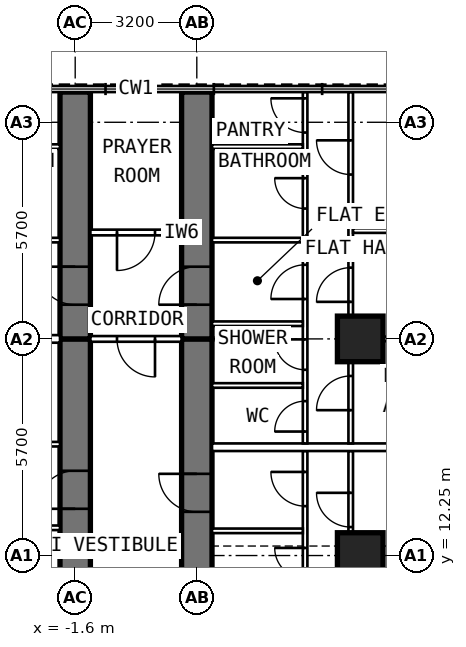
"""IFC4 building model, lengths in metres.
Left out: names, types, materials, properties, quantities, classifications, styles, units other than length and angle.
Written with IfcOpenShell. Run it as: python <this file> out.ifc"""

import sys

from ifc_helpers import new_model, si_unit, direction, frame, frame_2d, origin, origin_2d, place, context, subcontext, project, spatial, rectangle, extrude, element, fill, save


model = new_model("IFC4")
c1 = context("Model", 3, precision=1e-05, world=origin(), true_north=direction((0.0, 1.0)))
c2 = subcontext(c1, "Body", "Model", "MODEL_VIEW")
j1 = project(units=[si_unit("LENGTHUNIT", "METRE"), si_unit("PLANEANGLEUNIT", "RADIAN")], contexts=[c1])
p1 = place(None, origin())
s1 = spatial("IfcSite", under=j1, at=p1, CompositionType="ELEMENT")
p2 = place(p1, origin())
s2 = spatial("IfcBuilding", under=s1, at=p2, CompositionType="ELEMENT")
p3 = place(p2, frame((0.0, 0.0, 149.0)))
s3 = spatial("IfcBuildingStorey", under=s2, at=p3, CompositionType="ELEMENT", Elevation=149.0)
for number, where, z_axis, x_axis in (
    (1, (5.9, 12.25, 0.0), (0.0, 0.0, 1.0), (0.0, 1.0, 0.0)),
    (2, (5.9, 17.95, 0.0), (0.0, 0.0, 1.0), (0.0, 1.0, 0.0)),
):
    element("IfcColumn", number, at=place(p3, frame(where, z_axis=z_axis, x_axis=x_axis)), inside=s3, PredefinedType="COLUMN", context=c2, shape_type="SweptSolid", body=[
        extrude(rectangle(XDim=1.2, YDim=1.2, at=origin_2d()), origin(), (0.0, 0.0, 1.0), 3.6),
    ])
p4 = place(p3, frame((-1.6, 9.6, 0.0), z_axis=(0.0, 0.0, 1.0), x_axis=(0.0, 1.0, 0.0)))
e3 = element("IfcWall", 3, at=p4, inside=s3, PredefinedType="SHEAR", context=c2, shape_type="SweptSolid", body=[
    extrude(rectangle(XDim=8.35, YDim=0.8, at=frame_2d((4.175, 0.0))), origin(), (0.0, 0.0, 1.0), 3.6),
])
p5 = place(p4, frame((3.88, 0.0, 0.0)))
e4 = element("IfcOpeningElement", 4, at=p5, cuts=e3, PredefinedType="OPENING", context=c2, shape_type="SweptSolid", body=[
    extrude(rectangle(XDim=1.0, YDim=2.1, at=frame_2d((0.5, 1.05))), frame((0.0, 0.412, 0.0), z_axis=(0.0, -1.0, 0.0), x_axis=(1.0, 0.0, 0.0)), (0.0, 0.0, 1.0), 0.824),
])
p6 = place(p3, frame((-1.6, 17.95, 0.0), z_axis=(0.0, 0.0, 1.0), x_axis=(0.0, 1.0, 0.0)))
e5 = element("IfcWall", 5, at=p6, inside=s3, PredefinedType="SHEAR", context=c2, shape_type="SweptSolid", body=[
    extrude(rectangle(XDim=6.495, YDim=0.8, at=frame_2d((3.248, 0.0))), origin(), (0.0, 0.0, 1.0), 3.6),
])
p7 = place(p6, frame((0.9, 0.0, 0.0)))
e6 = element("IfcOpeningElement", 6, at=p7, cuts=e5, PredefinedType="OPENING", context=c2, shape_type="SweptSolid", body=[
    extrude(rectangle(XDim=1.0, YDim=2.1, at=frame_2d((0.5, 1.05))), frame((0.0, 0.412, 0.0), z_axis=(0.0, -1.0, 0.0), x_axis=(1.0, 0.0, 0.0)), (0.0, 0.0, 1.0), 0.824),
])
p8 = place(p3, frame((1.6, 9.6, 0.0), z_axis=(0.0, 0.0, 1.0), x_axis=(0.0, 1.0, 0.0)))
e7 = element("IfcWall", 7, at=p8, inside=s3, PredefinedType="SHEAR", context=c2, shape_type="SweptSolid", body=[
    extrude(rectangle(XDim=8.35, YDim=0.8, at=frame_2d((4.175, 0.0))), origin(), (0.0, 0.0, 1.0), 3.6),
])
p9 = place(p8, frame((3.8, 0.0, 0.0)))
e8 = element("IfcOpeningElement", 8, at=p9, cuts=e7, PredefinedType="OPENING", context=c2, shape_type="SweptSolid", body=[
    extrude(rectangle(XDim=1.0, YDim=2.1, at=frame_2d((0.5, 1.05))), frame((0.0, 0.412, 0.0), z_axis=(0.0, -1.0, 0.0), x_axis=(1.0, 0.0, 0.0)), (0.0, 0.0, 1.0), 0.824),
])
p10 = place(p3, frame((1.6, 17.95, 0.0), z_axis=(0.0, 0.0, 1.0), x_axis=(0.0, 1.0, 0.0)))
e9 = element("IfcWall", 9, at=p10, inside=s3, PredefinedType="SHEAR", context=c2, shape_type="SweptSolid", body=[
    extrude(rectangle(XDim=6.495, YDim=0.8, at=frame_2d((3.248, 0.0))), origin(), (0.0, 0.0, 1.0), 3.6),
])
p11 = place(p10, frame((0.9, 0.0, 0.0)))
e10 = element("IfcOpeningElement", 10, at=p11, cuts=e9, PredefinedType="OPENING", context=c2, shape_type="SweptSolid", body=[
    extrude(rectangle(XDim=1.0, YDim=2.1, at=frame_2d((0.5, 1.05))), frame((0.0, 0.412, 0.0), z_axis=(0.0, -1.0, 0.0), x_axis=(1.0, 0.0, 0.0)), (0.0, 0.0, 1.0), 0.824),
])
for number, where, z_axis, x_axis in (
    (11, (-2.0, 12.98, 0.0), (0.0, 0.0, 1.0), (-1.0, 0.0, 0.0)),
    (12, (-2.0, 15.18, 0.0), (0.0, 0.0, 1.0), (-1.0, 0.0, 0.0)),
    (13, (-2.0, 20.55, 0.0), (0.0, 0.0, 1.0), (-1.0, 0.0, 0.0)),
    (14, (-2.0, 23.01, 0.0), (0.0, 0.0, 1.0), (-1.0, 0.0, 0.0)),
):
    element("IfcWall", number, at=place(p3, frame(where, z_axis=z_axis, x_axis=x_axis)), inside=s3, PredefinedType="PARTITIONING", context=c2, shape_type="SweptSolid", body=[
        extrude(rectangle(XDim=2.39, YDim=0.12, at=frame_2d((1.195, 0.0))), origin(), (0.0, 0.0, 1.0), 3.35),
    ])
p12 = place(p3, frame((-2.0, 17.95, 0.0), z_axis=(0.0, 0.0, 1.0), x_axis=(-1.0, 0.0, 0.0)))
e15 = element("IfcWall", 15, at=p12, inside=s3, PredefinedType="PARTITIONING", context=c2, shape_type="SweptSolid", body=[
    extrude(rectangle(XDim=8.7, YDim=0.2, at=frame_2d((4.35, 0.0))), origin(), (0.0, 0.0, 1.0), 2.45),
])
p13 = place(p3, frame((4.45, 10.05, 0.0), z_axis=(0.0, 0.0, 1.0), x_axis=(0.0, 1.0, 0.0)))
e16 = element("IfcWall", 16, at=p13, inside=s3, PredefinedType="PARTITIONING", context=c2, shape_type="SweptSolid", body=[
    extrude(rectangle(XDim=4.95, YDim=0.12, at=frame_2d((2.475, 0.0))), origin(), (0.0, 0.0, 1.0), 3.35),
])
p14 = place(p13, frame((1.6, 0.0, 0.0)))
e17 = element("IfcOpeningElement", 17, at=p14, cuts=e16, PredefinedType="OPENING", context=c2, shape_type="SweptSolid", body=[
    extrude(rectangle(XDim=0.8, YDim=2.1, at=frame_2d((0.4, 1.05))), frame((0.0, 0.072, 0.0), z_axis=(0.0, -1.0, 0.0), x_axis=(1.0, 0.0, 0.0)), (0.0, 0.0, 1.0), 0.144),
])
p15 = place(p13, frame((3.5, 0.0, 0.0)))
e18 = element("IfcOpeningElement", 18, at=p15, cuts=e16, PredefinedType="OPENING", context=c2, shape_type="SweptSolid", body=[
    extrude(rectangle(XDim=0.9, YDim=2.1, at=frame_2d((0.45, 1.05))), frame((0.0, 0.072, 0.0), z_axis=(0.0, -1.0, 0.0), x_axis=(1.0, 0.0, 0.0)), (0.0, 0.0, 1.0), 0.144),
])
p16 = place(p3, frame((5.65, 9.6, 0.0), z_axis=(0.0, 0.0, 1.0), x_axis=(0.0, 1.0, 0.0)))
e19 = element("IfcWall", 19, at=p16, inside=s3, PredefinedType="PARTITIONING", context=c2, shape_type="SweptSolid", body=[
    extrude(rectangle(XDim=5.4, YDim=0.12, at=frame_2d((2.7, 0.0))), origin(), (0.0, 0.0, 1.0), 3.35),
])
p17 = place(p16, frame((3.4, 0.0, 0.0)))
e20 = element("IfcOpeningElement", 20, at=p17, cuts=e19, PredefinedType="OPENING", context=c2, shape_type="SweptSolid", body=[
    extrude(rectangle(XDim=0.9, YDim=2.1, at=frame_2d((0.45, 1.05))), frame((0.0, 0.072, 0.0), z_axis=(0.0, -1.0, 0.0), x_axis=(1.0, 0.0, 0.0)), (0.0, 0.0, 1.0), 0.144),
])
p18 = place(p3, frame((2.0, 12.9, 0.0), z_axis=(0.0, 0.0, 1.0), x_axis=(1.0, 0.0, 0.0)))
e21 = element("IfcWall", 21, at=p18, inside=s3, PredefinedType="PARTITIONING", context=c2, shape_type="SweptSolid", body=[
    extrude(rectangle(XDim=2.39, YDim=0.12, at=frame_2d((1.195, 0.0))), origin(), (0.0, 0.0, 1.0), 3.35),
])
p19 = place(p3, frame((4.45, 15.2, 0.0), z_axis=(0.0, 0.0, 1.0), x_axis=(0.0, 1.0, 0.0)))
e22 = element("IfcWall", 22, at=p19, inside=s3, PredefinedType="PARTITIONING", context=c2, shape_type="SweptSolid", body=[
    extrude(rectangle(XDim=9.245, YDim=0.12, at=frame_2d((4.623, 0.0))), origin(), (0.0, 0.0, 1.0), 3.35),
])
p20 = place(p19, frame((0.312, 0.0, 0.0)))
e23 = element("IfcOpeningElement", 23, at=p20, cuts=e22, PredefinedType="OPENING", context=c2, shape_type="SweptSolid", body=[
    extrude(rectangle(XDim=0.8, YDim=2.1, at=frame_2d((0.4, 1.05))), frame((0.0, 0.072, 0.0), z_axis=(0.0, -1.0, 0.0), x_axis=(1.0, 0.0, 0.0)), (0.0, 0.0, 1.0), 0.144),
])
p21 = place(p19, frame((1.938, 0.0, 0.0)))
e24 = element("IfcOpeningElement", 24, at=p21, cuts=e22, PredefinedType="OPENING", context=c2, shape_type="SweptSolid", body=[
    extrude(rectangle(XDim=0.8, YDim=2.1, at=frame_2d((0.4, 1.05))), frame((0.0, 0.072, 0.0), z_axis=(0.0, -1.0, 0.0), x_axis=(1.0, 0.0, 0.0)), (0.0, 0.0, 1.0), 0.144),
])
p22 = place(p19, frame((3.8, 0.0, 0.0)))
e25 = element("IfcOpeningElement", 25, at=p22, cuts=e22, PredefinedType="OPENING", context=c2, shape_type="SweptSolid", body=[
    extrude(rectangle(XDim=0.9, YDim=2.1, at=frame_2d((0.45, 1.05))), frame((0.0, 0.072, 0.0), z_axis=(0.0, -1.0, 0.0), x_axis=(1.0, 0.0, 0.0)), (0.0, 0.0, 1.0), 0.144),
])
p23 = place(p19, frame((6.18, 0.0, 0.0)))
e26 = element("IfcOpeningElement", 26, at=p23, cuts=e22, PredefinedType="OPENING", context=c2, shape_type="SweptSolid", body=[
    extrude(rectangle(XDim=0.8, YDim=2.1, at=frame_2d((0.4, 1.05))), frame((0.0, 0.072, 0.0), z_axis=(0.0, -1.0, 0.0), x_axis=(1.0, 0.0, 0.0)), (0.0, 0.0, 1.0), 0.144),
])
p24 = place(p19, frame((8.18, 0.0, 0.0)))
e27 = element("IfcOpeningElement", 27, at=p24, cuts=e22, PredefinedType="OPENING", context=c2, shape_type="SweptSolid", body=[
    extrude(rectangle(XDim=0.9, YDim=2.1, at=frame_2d((0.45, 1.05))), frame((0.0, 0.072, 0.0), z_axis=(0.0, -1.0, 0.0), x_axis=(1.0, 0.0, 0.0)), (0.0, 0.0, 1.0), 0.144),
])
p25 = place(p3, frame((5.65, 15.2, 0.0), z_axis=(0.0, 0.0, 1.0), x_axis=(0.0, 1.0, 0.0)))
e28 = element("IfcWall", 28, at=p25, inside=s3, PredefinedType="PARTITIONING", context=c2, shape_type="SweptSolid", body=[
    extrude(rectangle(XDim=9.245, YDim=0.12, at=frame_2d((4.623, 0.0))), origin(), (0.0, 0.0, 1.0), 3.35),
])
p26 = place(p25, frame((0.875, 0.0, 0.0)))
e29 = element("IfcOpeningElement", 29, at=p26, cuts=e28, PredefinedType="OPENING", context=c2, shape_type="SweptSolid", body=[
    extrude(rectangle(XDim=0.9, YDim=2.1, at=frame_2d((0.45, 1.05))), frame((0.0, 0.072, 0.0), z_axis=(0.0, -1.0, 0.0), x_axis=(1.0, 0.0, 0.0)), (0.0, 0.0, 1.0), 0.144),
])
p27 = place(p25, frame((3.725, 0.0, 0.0)))
e30 = element("IfcOpeningElement", 30, at=p27, cuts=e28, PredefinedType="OPENING", context=c2, shape_type="SweptSolid", body=[
    extrude(rectangle(XDim=0.9, YDim=2.1, at=frame_2d((0.45, 1.05))), frame((0.0, 0.072, 0.0), z_axis=(0.0, -1.0, 0.0), x_axis=(1.0, 0.0, 0.0)), (0.0, 0.0, 1.0), 0.144),
])
p28 = place(p25, frame((7.075, 0.0, 0.0)))
e31 = element("IfcOpeningElement", 31, at=p28, cuts=e28, PredefinedType="OPENING", context=c2, shape_type="SweptSolid", body=[
    extrude(rectangle(XDim=0.9, YDim=2.1, at=frame_2d((0.45, 1.05))), frame((0.0, 0.072, 0.0), z_axis=(0.0, -1.0, 0.0), x_axis=(1.0, 0.0, 0.0)), (0.0, 0.0, 1.0), 0.144),
])
p29 = place(p3, frame((5.71, 17.95, 0.0), z_axis=(0.0, 0.0, 1.0), x_axis=(1.0, 0.0, 0.0)))
e32 = element("IfcWall", 32, at=p29, inside=s3, PredefinedType="PARTITIONING", context=c2, shape_type="SweptSolid", body=[
    extrude(rectangle(XDim=4.99, YDim=0.12, at=frame_2d((2.495, 0.0))), origin(), (0.0, 0.0, 1.0), 2.45),
])
p30 = place(p3, frame((5.71, 20.8, 0.0), z_axis=(0.0, 0.0, 1.0), x_axis=(1.0, 0.0, 0.0)))
e33 = element("IfcWall", 33, at=p30, inside=s3, PredefinedType="PARTITIONING", context=c2, shape_type="SweptSolid", body=[
    extrude(rectangle(XDim=4.99, YDim=0.12, at=frame_2d((2.495, 0.0))), origin(), (0.0, 0.0, 1.0), 3.35),
])
for number, where, z_axis, x_axis in (
    (34, (2.0, 16.725, 0.0), (0.0, 0.0, 1.0), (1.0, 0.0, 0.0)),
    (35, (2.0, 18.35, 0.0), (0.0, 0.0, 1.0), (1.0, 0.0, 0.0)),
    (36, (2.0, 20.55, 0.0), (0.0, 0.0, 1.0), (1.0, 0.0, 0.0)),
    (37, (2.0, 23.01, 0.0), (0.0, 0.0, 1.0), (1.0, 0.0, 0.0)),
):
    element("IfcWall", number, at=place(p3, frame(where, z_axis=z_axis, x_axis=x_axis)), inside=s3, PredefinedType="PARTITIONING", context=c2, shape_type="SweptSolid", body=[
        extrude(rectangle(XDim=2.39, YDim=0.12, at=frame_2d((1.195, 0.0))), origin(), (0.0, 0.0, 1.0), 3.35),
    ])
p31 = place(p3, frame((2.0, 15.1, 0.0), z_axis=(0.0, 0.0, 1.0), x_axis=(1.0, 0.0, 0.0)))
e38 = element("IfcWall", 38, at=p31, inside=s3, PredefinedType="PARTITIONING", context=c2, shape_type="SweptSolid", body=[
    extrude(rectangle(XDim=8.7, YDim=0.2, at=frame_2d((4.35, 0.0))), origin(), (0.0, 0.0, 1.0), 3.35),
])
p32 = place(p3, frame((1.2, 20.75, 0.0), z_axis=(0.0, 0.0, 1.0), x_axis=(-1.0, 0.0, 0.0)))
e39 = element("IfcWall", 39, at=p32, inside=s3, PredefinedType="PARTITIONING", context=c2, shape_type="SweptSolid", body=[
    extrude(rectangle(XDim=2.4, YDim=0.15, at=frame_2d((1.2, 0.0))), origin(), (0.0, 0.0, 1.0), 3.35),
])
p33 = place(p32, frame((0.7, 0.0, 0.0)))
e40 = element("IfcOpeningElement", 40, at=p33, cuts=e39, PredefinedType="OPENING", context=c2, shape_type="SweptSolid", body=[
    extrude(rectangle(XDim=1.0, YDim=2.1, at=frame_2d((0.5, 1.05))), frame((0.0, 0.087, 0.0), z_axis=(0.0, -1.0, 0.0), x_axis=(1.0, 0.0, 0.0)), (0.0, 0.0, 1.0), 0.174),
])
p34 = place(p3, frame((1.2, 17.95, 0.0), z_axis=(0.0, 0.0, 1.0), x_axis=(-1.0, 0.0, 0.0)))
e41 = element("IfcWall", 41, at=p34, inside=s3, PredefinedType="PARTITIONING", context=c2, shape_type="SweptSolid", body=[
    extrude(rectangle(XDim=2.4, YDim=0.15, at=frame_2d((1.2, 0.0))), origin(), (0.0, 0.0, 1.0), 3.35),
])
p35 = place(p34, frame((0.7, 0.0, 0.0)))
e42 = element("IfcOpeningElement", 42, at=p35, cuts=e41, PredefinedType="OPENING", context=c2, shape_type="SweptSolid", body=[
    extrude(rectangle(XDim=1.0, YDim=2.1, at=frame_2d((0.5, 1.05))), frame((0.0, 0.087, 0.0), z_axis=(0.0, -1.0, 0.0), x_axis=(1.0, 0.0, 0.0)), (0.0, 0.0, 1.0), 0.174),
])
p36 = place(p5, origin())
e43 = element("IfcDoor", 43, at=p36, inside=s3, OperationType="SINGLE_SWING_LEFT", PredefinedType="DOOR", context=c2, shape_type="SweptSolid", body=[
    extrude(rectangle(XDim=1.0, YDim=2.1, at=frame_2d((0.5, 1.05))), frame((0.0, 0.15, 0.0), z_axis=(0.0, -1.0, 0.0), x_axis=(1.0, 0.0, 0.0)), (0.0, 0.0, 1.0), 0.3),
])
fill(e4, e43)
p37 = place(p7, origin())
e44 = element("IfcDoor", 44, at=p37, inside=s3, OperationType="SINGLE_SWING_RIGHT", PredefinedType="DOOR", context=c2, shape_type="SweptSolid", body=[
    extrude(rectangle(XDim=1.0, YDim=2.1, at=frame_2d((0.5, 1.05))), frame((0.0, 0.15, 0.0), z_axis=(0.0, -1.0, 0.0), x_axis=(1.0, 0.0, 0.0)), (0.0, 0.0, 1.0), 0.3),
])
fill(e6, e44)
p38 = place(p9, origin())
e45 = element("IfcDoor", 45, at=p38, inside=s3, OperationType="SINGLE_SWING_RIGHT", PredefinedType="DOOR", context=c2, shape_type="SweptSolid", body=[
    extrude(rectangle(XDim=1.0, YDim=2.1, at=frame_2d((0.5, 1.05))), frame((0.0, 0.15, 0.0), z_axis=(0.0, -1.0, 0.0), x_axis=(1.0, 0.0, 0.0)), (0.0, 0.0, 1.0), 0.3),
])
fill(e8, e45)
p39 = place(p17, origin())
e46 = element("IfcDoor", 46, at=p39, inside=s3, OperationType="SINGLE_SWING_RIGHT", PredefinedType="DOOR", context=c2, shape_type="SweptSolid", body=[
    extrude(rectangle(XDim=0.9, YDim=2.1, at=frame_2d((0.45, 1.05))), frame((0.0, 0.025, 0.0), z_axis=(0.0, -1.0, 0.0), x_axis=(1.0, 0.0, 0.0)), (0.0, 0.0, 1.0), 0.05),
])
fill(e20, e46)
p40 = place(p14, origin())
e47 = element("IfcDoor", 47, at=p40, inside=s3, OperationType="SINGLE_SWING_RIGHT", PredefinedType="DOOR", context=c2, shape_type="SweptSolid", body=[
    extrude(rectangle(XDim=0.8, YDim=2.1, at=frame_2d((0.4, 1.05))), frame((0.0, 0.025, 0.0), z_axis=(0.0, -1.0, 0.0), x_axis=(1.0, 0.0, 0.0)), (0.0, 0.0, 1.0), 0.05),
])
fill(e17, e47)
p41 = place(p15, origin())
e48 = element("IfcDoor", 48, at=p41, inside=s3, OperationType="SINGLE_SWING_RIGHT", PredefinedType="DOOR", context=c2, shape_type="SweptSolid", body=[
    extrude(rectangle(XDim=0.9, YDim=2.1, at=frame_2d((0.45, 1.05))), frame((0.0, 0.025, 0.0), z_axis=(0.0, -1.0, 0.0), x_axis=(1.0, 0.0, 0.0)), (0.0, 0.0, 1.0), 0.05),
])
fill(e18, e48)
p42 = place(p11, origin())
e49 = element("IfcDoor", 49, at=p42, inside=s3, OperationType="SINGLE_SWING_LEFT", PredefinedType="DOOR", context=c2, shape_type="SweptSolid", body=[
    extrude(rectangle(XDim=1.0, YDim=2.1, at=frame_2d((0.5, 1.05))), frame((0.0, 0.15, 0.0), z_axis=(0.0, -1.0, 0.0), x_axis=(1.0, 0.0, 0.0)), (0.0, 0.0, 1.0), 0.3),
])
fill(e10, e49)
p43 = place(p26, origin())
e50 = element("IfcDoor", 50, at=p43, inside=s3, OperationType="SINGLE_SWING_LEFT", PredefinedType="DOOR", context=c2, shape_type="SweptSolid", body=[
    extrude(rectangle(XDim=0.9, YDim=2.1, at=frame_2d((0.45, 1.05))), frame((0.0, 0.025, 0.0), z_axis=(0.0, -1.0, 0.0), x_axis=(1.0, 0.0, 0.0)), (0.0, 0.0, 1.0), 0.05),
])
fill(e29, e50)
p44 = place(p27, origin())
e51 = element("IfcDoor", 51, at=p44, inside=s3, OperationType="SINGLE_SWING_LEFT", PredefinedType="DOOR", context=c2, shape_type="SweptSolid", body=[
    extrude(rectangle(XDim=0.9, YDim=2.1, at=frame_2d((0.45, 1.05))), frame((0.0, 0.025, 0.0), z_axis=(0.0, -1.0, 0.0), x_axis=(1.0, 0.0, 0.0)), (0.0, 0.0, 1.0), 0.05),
])
fill(e30, e51)
p45 = place(p28, origin())
e52 = element("IfcDoor", 52, at=p45, inside=s3, OperationType="SINGLE_SWING_RIGHT", PredefinedType="DOOR", context=c2, shape_type="SweptSolid", body=[
    extrude(rectangle(XDim=0.9, YDim=2.1, at=frame_2d((0.45, 1.05))), frame((0.0, 0.025, 0.0), z_axis=(0.0, -1.0, 0.0), x_axis=(1.0, 0.0, 0.0)), (0.0, 0.0, 1.0), 0.05),
])
fill(e31, e52)
p46 = place(p20, origin())
e53 = element("IfcDoor", 53, at=p46, inside=s3, OperationType="SINGLE_SWING_LEFT", PredefinedType="DOOR", context=c2, shape_type="SweptSolid", body=[
    extrude(rectangle(XDim=0.8, YDim=2.1, at=frame_2d((0.4, 1.05))), frame((0.0, 0.025, 0.0), z_axis=(0.0, -1.0, 0.0), x_axis=(1.0, 0.0, 0.0)), (0.0, 0.0, 1.0), 0.05),
])
fill(e23, e53)
p47 = place(p21, origin())
e54 = element("IfcDoor", 54, at=p47, inside=s3, OperationType="SINGLE_SWING_RIGHT", PredefinedType="DOOR", context=c2, shape_type="SweptSolid", body=[
    extrude(rectangle(XDim=0.8, YDim=2.1, at=frame_2d((0.4, 1.05))), frame((0.0, 0.025, 0.0), z_axis=(0.0, -1.0, 0.0), x_axis=(1.0, 0.0, 0.0)), (0.0, 0.0, 1.0), 0.05),
])
fill(e24, e54)
p48 = place(p22, origin())
e55 = element("IfcDoor", 55, at=p48, inside=s3, OperationType="SINGLE_SWING_LEFT", PredefinedType="DOOR", context=c2, shape_type="SweptSolid", body=[
    extrude(rectangle(XDim=0.9, YDim=2.1, at=frame_2d((0.45, 1.05))), frame((0.0, 0.025, 0.0), z_axis=(0.0, -1.0, 0.0), x_axis=(1.0, 0.0, 0.0)), (0.0, 0.0, 1.0), 0.05),
])
fill(e25, e55)
p49 = place(p23, origin())
e56 = element("IfcDoor", 56, at=p49, inside=s3, OperationType="SINGLE_SWING_RIGHT", PredefinedType="DOOR", context=c2, shape_type="SweptSolid", body=[
    extrude(rectangle(XDim=0.8, YDim=2.1, at=frame_2d((0.4, 1.05))), frame((0.0, 0.025, 0.0), z_axis=(0.0, -1.0, 0.0), x_axis=(1.0, 0.0, 0.0)), (0.0, 0.0, 1.0), 0.05),
])
fill(e26, e56)
p50 = place(p24, origin())
e57 = element("IfcDoor", 57, at=p50, inside=s3, OperationType="SINGLE_SWING_RIGHT", PredefinedType="DOOR", context=c2, shape_type="SweptSolid", body=[
    extrude(rectangle(XDim=0.9, YDim=2.1, at=frame_2d((0.45, 1.05))), frame((0.0, 0.025, 0.0), z_axis=(0.0, -1.0, 0.0), x_axis=(1.0, 0.0, 0.0)), (0.0, 0.0, 1.0), 0.05),
])
fill(e27, e57)
p51 = place(p33, origin())
e58 = element("IfcDoor", 58, at=p51, inside=s3, OperationType="SINGLE_SWING_RIGHT", PredefinedType="DOOR", context=c2, shape_type="SweptSolid", body=[
    extrude(rectangle(XDim=1.0, YDim=2.1, at=frame_2d((0.5, 1.05))), frame((0.0, 0.025, 0.0), z_axis=(0.0, -1.0, 0.0), x_axis=(1.0, 0.0, 0.0)), (0.0, 0.0, 1.0), 0.05),
])
fill(e40, e58)
p52 = place(p35, origin())
e59 = element("IfcDoor", 59, at=p52, inside=s3, OperationType="SINGLE_SWING_LEFT", PredefinedType="DOOR", context=c2, shape_type="SweptSolid", body=[
    extrude(rectangle(XDim=1.0, YDim=2.1, at=frame_2d((0.5, 1.05))), frame((0.0, 0.025, 0.0), z_axis=(0.0, -1.0, 0.0), x_axis=(1.0, 0.0, 0.0)), (0.0, 0.0, 1.0), 0.05),
])
fill(e42, e59)
save(model, sys.argv[1])
